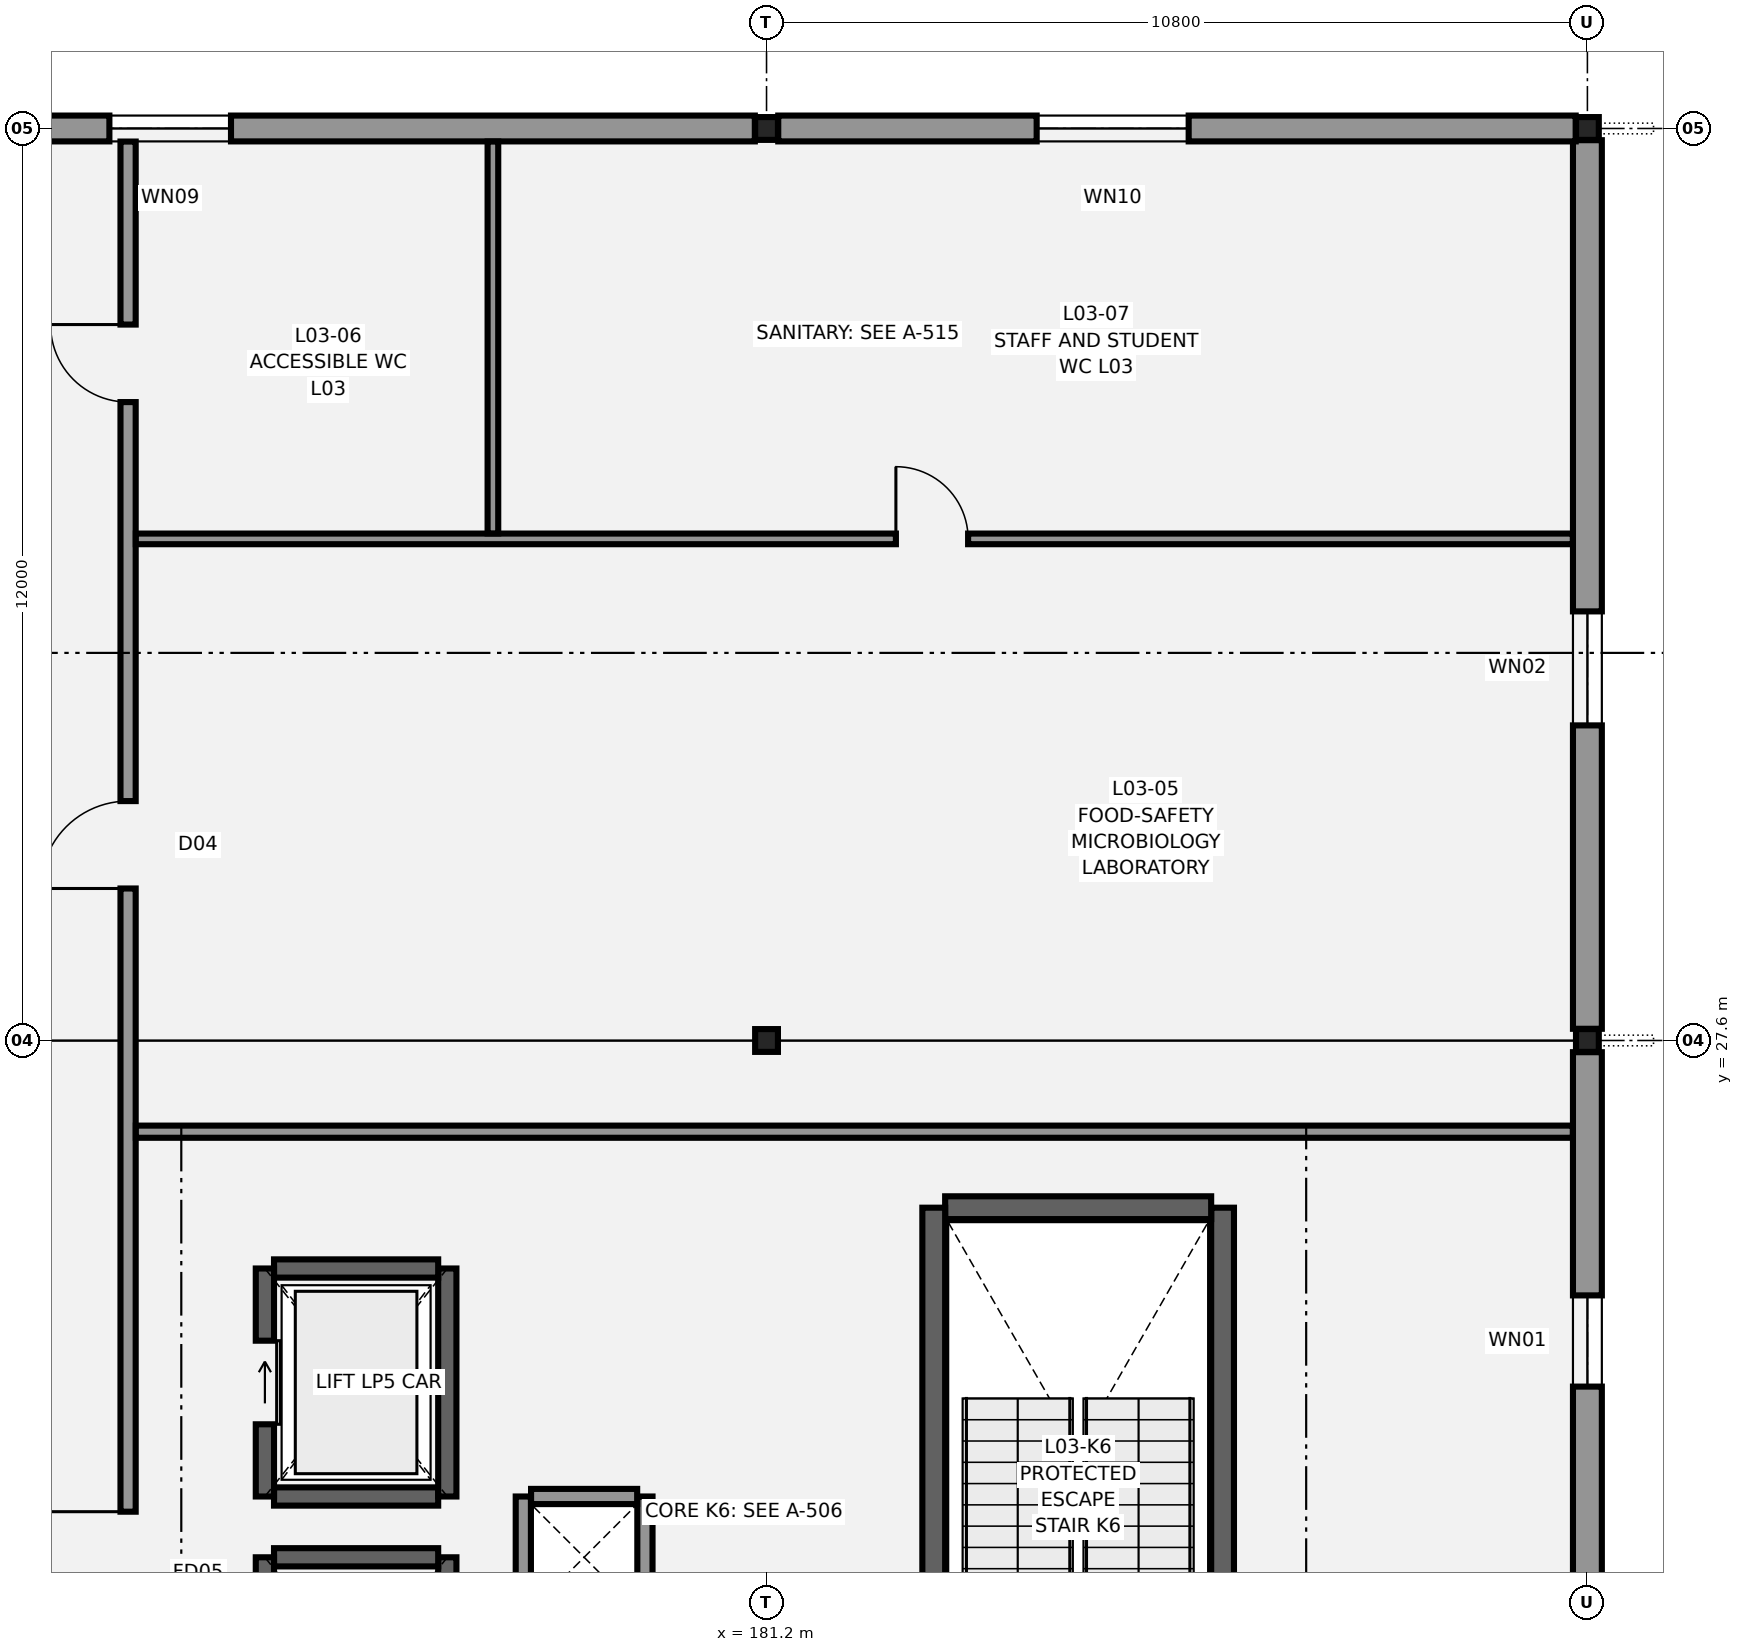
"""IFC4 building model, lengths in metres.
Left out: names, types, materials, properties, quantities, classifications, styles, units other than length and angle.
Written with IfcOpenShell. Run it as: python <this file> out.ifc"""

import sys

from ifc_helpers import new_model, si_unit, direction, frame, frame_2d, origin, origin_2d, place, context, subcontext, project, spatial, rectangle, i_section, extrude, element, fill, save


model = new_model("IFC4")
c1 = context("Model", 3, precision=1e-05, world=origin(), true_north=direction((0.0, 1.0)))
c2 = subcontext(c1, "Body", "Model", "MODEL_VIEW")
j1 = project(units=[si_unit("LENGTHUNIT", "METRE"), si_unit("PLANEANGLEUNIT", "RADIAN")], contexts=[c1])
p1 = place(None, origin())
s1 = spatial("IfcSite", under=j1, at=p1, CompositionType="ELEMENT")
p2 = place(p1, origin())
s2 = spatial("IfcBuilding", under=s1, at=p2, CompositionType="ELEMENT")
p3 = place(p2, frame((0.0, 0.0, 14.4)))
s3 = spatial("IfcBuildingStorey", under=s2, at=p3, CompositionType="ELEMENT", Elevation=14.4)
for number, where, z_axis, x_axis in (
    (1, (181.2, 27.6, 0.0), (0.0, 0.0, 1.0), (1.0, 0.0, 0.0)),
    (2, (181.2, 39.6, 0.0), (0.0, 0.0, 1.0), (1.0, 0.0, 0.0)),
    (3, (192.0, 27.6, 0.0), (0.0, 0.0, 1.0), (1.0, 0.0, 0.0)),
    (4, (192.0, 39.6, 0.0), (0.0, 0.0, 1.0), (1.0, 0.0, 0.0)),
):
    element("IfcColumn", number, at=place(p3, frame(where, z_axis=z_axis, x_axis=x_axis)), inside=s3, PredefinedType="COLUMN", context=c2, shape_type="SweptSolid", body=[
        extrude(i_section(OverallWidth=0.3, OverallDepth=0.3, WebThickness=0.011, FlangeThickness=0.019, FilletRadius=0.027, at=origin_2d()), origin(), (0.0, 0.0, 1.0), 4.2),
    ])
p4 = place(p3, frame((187.2, 17.4, 0.0), z_axis=(0.0, 0.0, 1.0), x_axis=(0.0, 1.0, 0.0)))
e5 = element("IfcWall", 5, at=p4, inside=s3, PredefinedType="SHEAR", context=c2, shape_type="SweptSolid", body=[
    extrude(rectangle(XDim=8.0, YDim=0.3, at=frame_2d((4.0, 0.0))), origin(), (0.0, 0.0, 1.0), 3.98),
])
p5 = place(p3, frame((187.05, 25.4, 0.0), z_axis=(0.0, 0.0, 1.0), x_axis=(-1.0, 0.0, 0.0)))
e6 = element("IfcWall", 6, at=p5, inside=s3, PredefinedType="SHEAR", context=c2, shape_type="SweptSolid", body=[
    extrude(rectangle(XDim=3.5, YDim=0.3, at=frame_2d((1.75, 0.0))), origin(), (0.0, 0.0, 1.0), 3.98),
])
p6 = place(p3, frame((183.4, 25.4, 0.0), z_axis=(0.0, 0.0, 1.0), x_axis=(0.0, -1.0, 0.0)))
e7 = element("IfcWall", 7, at=p6, inside=s3, PredefinedType="SHEAR", context=c2, shape_type="SweptSolid", body=[
    extrude(rectangle(XDim=8.0, YDim=0.3, at=frame_2d((4.0, 0.0))), origin(), (0.0, 0.0, 1.0), 3.98),
])
p7 = place(p3, frame((177.0, 17.8, 0.0), z_axis=(0.0, 0.0, 1.0), x_axis=(0.0, 1.0, 0.0)))
e8 = element("IfcWall", 8, at=p7, inside=s3, PredefinedType="SHEAR", context=c2, shape_type="SweptSolid", body=[
    extrude(rectangle(XDim=3.0, YDim=0.24, at=frame_2d((1.5, 0.0))), origin(), (0.0, 0.0, 1.0), 3.98),
])
p8 = place(p3, frame((176.88, 20.8, 0.0), z_axis=(0.0, 0.0, 1.0), x_axis=(-1.0, 0.0, 0.0)))
e9 = element("IfcWall", 9, at=p8, inside=s3, PredefinedType="SHEAR", context=c2, shape_type="SweptSolid", body=[
    extrude(rectangle(XDim=2.16, YDim=0.24, at=frame_2d((1.08, 0.0))), origin(), (0.0, 0.0, 1.0), 3.98),
])
p9 = place(p3, frame((174.6, 20.8, 0.0), z_axis=(0.0, 0.0, 1.0), x_axis=(0.0, -1.0, 0.0)))
e10 = element("IfcWall", 10, at=p9, inside=s3, PredefinedType="SHEAR", context=c2, shape_type="SweptSolid", body=[
    extrude(rectangle(XDim=3.0, YDim=0.24, at=frame_2d((1.5, 0.0))), origin(), (0.0, 0.0, 1.0), 3.98),
])
p10 = place(p9, frame((0.95, 0.0, 0.0)))
e11 = element("IfcOpeningElement", 11, at=p10, cuts=e10, PredefinedType="OPENING", context=c2, shape_type="SweptSolid", body=[
    extrude(rectangle(XDim=1.1, YDim=2.1, at=frame_2d((0.55, 1.05))), frame((0.0, 0.13, 0.0), z_axis=(0.0, -1.0, 0.0), x_axis=(1.0, 0.0, 0.0)), (0.0, 0.0, 1.0), 0.26),
])
p11 = place(p3, frame((174.72, 21.6, 0.0), z_axis=(0.0, 0.0, 1.0), x_axis=(1.0, 0.0, 0.0)))
e12 = element("IfcWall", 12, at=p11, inside=s3, PredefinedType="SHEAR", context=c2, shape_type="SweptSolid", body=[
    extrude(rectangle(XDim=2.16, YDim=0.24, at=frame_2d((1.08, 0.0))), origin(), (0.0, 0.0, 1.0), 3.98),
])
p12 = place(p3, frame((177.0, 21.6, 0.0), z_axis=(0.0, 0.0, 1.0), x_axis=(0.0, 1.0, 0.0)))
e13 = element("IfcWall", 13, at=p12, inside=s3, PredefinedType="SHEAR", context=c2, shape_type="SweptSolid", body=[
    extrude(rectangle(XDim=3.0, YDim=0.24, at=frame_2d((1.5, 0.0))), origin(), (0.0, 0.0, 1.0), 3.98),
])
p13 = place(p3, frame((176.88, 24.6, 0.0), z_axis=(0.0, 0.0, 1.0), x_axis=(-1.0, 0.0, 0.0)))
e14 = element("IfcWall", 14, at=p13, inside=s3, PredefinedType="SHEAR", context=c2, shape_type="SweptSolid", body=[
    extrude(rectangle(XDim=2.16, YDim=0.24, at=frame_2d((1.08, 0.0))), origin(), (0.0, 0.0, 1.0), 3.98),
])
p14 = place(p3, frame((174.6, 24.6, 0.0), z_axis=(0.0, 0.0, 1.0), x_axis=(0.0, -1.0, 0.0)))
e15 = element("IfcWall", 15, at=p14, inside=s3, PredefinedType="SHEAR", context=c2, shape_type="SweptSolid", body=[
    extrude(rectangle(XDim=3.0, YDim=0.24, at=frame_2d((1.5, 0.0))), origin(), (0.0, 0.0, 1.0), 3.98),
])
p15 = place(p14, frame((0.95, 0.0, 0.0)))
e16 = element("IfcOpeningElement", 16, at=p15, cuts=e15, PredefinedType="OPENING", context=c2, shape_type="SweptSolid", body=[
    extrude(rectangle(XDim=1.1, YDim=2.1, at=frame_2d((0.55, 1.05))), frame((0.0, 0.13, 0.0), z_axis=(0.0, -1.0, 0.0), x_axis=(1.0, 0.0, 0.0)), (0.0, 0.0, 1.0), 0.26),
])
p16 = place(p3, frame((192.0, 27.446, 0.0), z_axis=(0.0, 0.0, 1.0), x_axis=(0.0, -1.0, 0.0)))
e17 = element("IfcWall", 17, at=p16, inside=s3, PredefinedType="STANDARD", context=c2, shape_type="SweptSolid", body=[
    extrude(rectangle(XDim=11.692, YDim=0.38, at=frame_2d((5.846, 0.0))), origin(), (0.0, 0.0, 1.0), 3.685),
])
p17 = place(p16, frame((3.2, 0.0, 0.8)))
e18 = element("IfcOpeningElement", 18, at=p17, cuts=e17, PredefinedType="OPENING", context=c2, shape_type="SweptSolid", body=[
    extrude(rectangle(XDim=1.2, YDim=1.8, at=frame_2d((0.6, 0.9))), frame((0.0, 0.2, 0.0), z_axis=(0.0, -1.0, 0.0), x_axis=(1.0, 0.0, 0.0)), (0.0, 0.0, 1.0), 0.4),
])
p18 = place(p3, frame((192.0, 39.446, 0.0), z_axis=(0.0, 0.0, 1.0), x_axis=(0.0, -1.0, 0.0)))
e19 = element("IfcWall", 19, at=p18, inside=s3, PredefinedType="STANDARD", context=c2, shape_type="SweptSolid", body=[
    extrude(rectangle(XDim=11.692, YDim=0.38, at=frame_2d((5.846, 0.0))), origin(), (0.0, 0.0, 1.0), 3.625),
])
p19 = place(p18, frame((6.2, 0.0, 0.8)))
e20 = element("IfcOpeningElement", 20, at=p19, cuts=e19, PredefinedType="OPENING", context=c2, shape_type="SweptSolid", body=[
    extrude(rectangle(XDim=1.5, YDim=1.8, at=frame_2d((0.75, 0.9))), frame((0.0, 0.2, 0.0), z_axis=(0.0, -1.0, 0.0), x_axis=(1.0, 0.0, 0.0)), (0.0, 0.0, 1.0), 0.4),
])
p20 = place(p3, frame((170.554, 39.6, 0.0), z_axis=(0.0, 0.0, 1.0), x_axis=(1.0, 0.0, 0.0)))
e21 = element("IfcWall", 21, at=p20, inside=s3, PredefinedType="STANDARD", context=c2, shape_type="SweptSolid", body=[
    extrude(rectangle(XDim=10.492, YDim=0.34, at=frame_2d((5.246, 0.0))), origin(), (0.0, 0.0, 1.0), 3.625),
])
p21 = place(p20, frame((2.0, 0.0, 0.8)))
e22 = element("IfcOpeningElement", 22, at=p21, cuts=e21, PredefinedType="OPENING", context=c2, shape_type="SweptSolid", body=[
    extrude(rectangle(XDim=1.6, YDim=2.0, at=frame_2d((0.8, 1.0))), frame((0.0, 0.18, 0.0), z_axis=(0.0, -1.0, 0.0), x_axis=(1.0, 0.0, 0.0)), (0.0, 0.0, 1.0), 0.36),
])
p22 = place(p3, frame((181.354, 39.6, 0.0), z_axis=(0.0, 0.0, 1.0), x_axis=(1.0, 0.0, 0.0)))
e23 = element("IfcWall", 23, at=p22, inside=s3, PredefinedType="STANDARD", context=c2, shape_type="SweptSolid", body=[
    extrude(rectangle(XDim=10.492, YDim=0.34, at=frame_2d((5.246, 0.0))), origin(), (0.0, 0.0, 1.0), 3.625),
])
p23 = place(p22, frame((3.4, 0.0, 0.8)))
e24 = element("IfcOpeningElement", 24, at=p23, cuts=e23, PredefinedType="OPENING", context=c2, shape_type="SweptSolid", body=[
    extrude(rectangle(XDim=2.0, YDim=2.0, at=frame_2d((1.0, 1.0))), frame((0.0, 0.18, 0.0), z_axis=(0.0, -1.0, 0.0), x_axis=(1.0, 0.0, 0.0)), (0.0, 0.0, 1.0), 0.36),
])
p24 = place(p3, frame((172.8, 6.8, 0.0), z_axis=(0.0, 0.0, 1.0), x_axis=(0.0, 1.0, 0.0)))
e25 = element("IfcWall", 25, at=p24, inside=s3, PredefinedType="PARTITIONING", context=c2, shape_type="SweptSolid", body=[
    extrude(rectangle(XDim=32.628, YDim=0.2, at=frame_2d((16.314, 0.0))), origin(), (0.0, 0.0, 1.0), 3.84),
])
p25 = place(p24, frame((3.2, 0.0, 0.0)))
e26 = element("IfcOpeningElement", 26, at=p25, cuts=e25, PredefinedType="OPENING", context=c2, shape_type="SweptSolid", body=[
    extrude(rectangle(XDim=1.05, YDim=2.15, at=frame_2d((0.525, 1.075))), frame((0.0, 0.11, 0.0), z_axis=(0.0, -1.0, 0.0), x_axis=(1.0, 0.0, 0.0)), (0.0, 0.0, 1.0), 0.22),
])
p26 = place(p24, frame((13.0, 0.0, 0.0)))
e27 = element("IfcOpeningElement", 27, at=p26, cuts=e25, PredefinedType="OPENING", context=c2, shape_type="SweptSolid", body=[
    extrude(rectangle(XDim=1.6, YDim=2.2, at=frame_2d((0.8, 1.1))), frame((0.0, 0.11, 0.0), z_axis=(0.0, -1.0, 0.0), x_axis=(1.0, 0.0, 0.0)), (0.0, 0.0, 1.0), 0.22),
])
p27 = place(p24, frame((22.8, 0.0, 0.0)))
e28 = element("IfcOpeningElement", 28, at=p27, cuts=e25, PredefinedType="OPENING", context=c2, shape_type="SweptSolid", body=[
    extrude(rectangle(XDim=1.15, YDim=2.15, at=frame_2d((0.575, 1.075))), frame((0.0, 0.11, 0.0), z_axis=(0.0, -1.0, 0.0), x_axis=(1.0, 0.0, 0.0)), (0.0, 0.0, 1.0), 0.22),
])
p28 = place(p24, frame((29.2, 0.0, 0.0)))
e29 = element("IfcOpeningElement", 29, at=p28, cuts=e25, PredefinedType="OPENING", context=c2, shape_type="SweptSolid", body=[
    extrude(rectangle(XDim=1.02, YDim=2.12, at=frame_2d((0.51, 1.06))), frame((0.0, 0.11, 0.0), z_axis=(0.0, -1.0, 0.0), x_axis=(1.0, 0.0, 0.0)), (0.0, 0.0, 1.0), 0.22),
])
p29 = place(p24, frame((4.6, 0.0, 1.05)))
e30 = element("IfcOpeningElement", 30, at=p29, cuts=e25, PredefinedType="OPENING", context=c2, shape_type="SweptSolid", body=[
    extrude(rectangle(XDim=2.8, YDim=1.3, at=frame_2d((1.4, 0.65))), frame((0.0, 0.11, 0.0), z_axis=(0.0, -1.0, 0.0), x_axis=(1.0, 0.0, 0.0)), (0.0, 0.0, 1.0), 0.22),
])
p30 = place(p3, frame((172.902, 26.4, 0.0), z_axis=(0.0, 0.0, 1.0), x_axis=(1.0, 0.0, 0.0)))
e31 = element("IfcWall", 31, at=p30, inside=s3, PredefinedType="PARTITIONING", context=c2, shape_type="SweptSolid", body=[
    extrude(rectangle(XDim=18.906, YDim=0.16, at=frame_2d((9.453, 0.0))), origin(), (0.0, 0.0, 1.0), 3.84),
])
p31 = place(p3, frame((172.902, 34.2, 0.0), z_axis=(0.0, 0.0, 1.0), x_axis=(1.0, 0.0, 0.0)))
e32 = element("IfcWall", 32, at=p31, inside=s3, PredefinedType="PARTITIONING", context=c2, shape_type="SweptSolid", body=[
    extrude(rectangle(XDim=18.906, YDim=0.14, at=frame_2d((9.453, 0.0))), origin(), (0.0, 0.0, 1.0), 3.84),
])
p32 = place(p31, frame((10.0, 0.0, 0.0)))
e33 = element("IfcOpeningElement", 33, at=p32, cuts=e32, PredefinedType="OPENING", context=c2, shape_type="SweptSolid", body=[
    extrude(rectangle(XDim=0.95, YDim=2.1, at=frame_2d((0.475, 1.05))), frame((0.0, 0.08, 0.0), z_axis=(0.0, -1.0, 0.0), x_axis=(1.0, 0.0, 0.0)), (0.0, 0.0, 1.0), 0.16),
])
p33 = place(p3, frame((177.6, 34.272, 0.0), z_axis=(0.0, 0.0, 1.0), x_axis=(0.0, 1.0, 0.0)))
e34 = element("IfcWall", 34, at=p33, inside=s3, PredefinedType="PARTITIONING", context=c2, shape_type="SweptSolid", body=[
    extrude(rectangle(XDim=5.156, YDim=0.14, at=frame_2d((2.578, 0.0))), origin(), (0.0, 0.0, 1.0), 3.84),
])
p34 = place(p3, frame((179.6, 20.0, 0.0), z_axis=(0.0, 0.0, 1.0), x_axis=(0.0, 1.0, 0.0)))
e35 = element("IfcWall", 35, at=p34, inside=s3, PredefinedType="PARTITIONING", context=c2, shape_type="SweptSolid", body=[
    extrude(rectangle(XDim=1.6, YDim=0.2, at=frame_2d((0.8, 0.0))), origin(), (0.0, 0.0, 1.0), 3.84),
])
p35 = place(p3, frame((179.498, 21.6, 0.0), z_axis=(0.0, 0.0, 1.0), x_axis=(-1.0, 0.0, 0.0)))
e36 = element("IfcWall", 36, at=p35, inside=s3, PredefinedType="PARTITIONING", context=c2, shape_type="SweptSolid", body=[
    extrude(rectangle(XDim=1.396, YDim=0.2, at=frame_2d((0.698, 0.0))), origin(), (0.0, 0.0, 1.0), 3.84),
])
p36 = place(p3, frame((178.0, 21.6, 0.0), z_axis=(0.0, 0.0, 1.0), x_axis=(0.0, -1.0, 0.0)))
e37 = element("IfcWall", 37, at=p36, inside=s3, PredefinedType="PARTITIONING", context=c2, shape_type="SweptSolid", body=[
    extrude(rectangle(XDim=1.6, YDim=0.2, at=frame_2d((0.8, 0.0))), origin(), (0.0, 0.0, 1.0), 3.84),
])
p37 = place(p17, origin())
e38 = element("IfcWindow", 38, at=p37, inside=s3, PartitioningType="SINGLE_PANEL", PredefinedType="WINDOW", context=c2, shape_type="SweptSolid", body=[
    extrude(rectangle(XDim=1.2, YDim=1.8, at=frame_2d((0.6, 0.9))), frame((0.0, 0.03, 0.0), z_axis=(0.0, -1.0, 0.0), x_axis=(1.0, 0.0, 0.0)), (0.0, 0.0, 1.0), 0.06),
])
fill(e18, e38)
p38 = place(p19, origin())
e39 = element("IfcWindow", 39, at=p38, inside=s3, PartitioningType="SINGLE_PANEL", PredefinedType="WINDOW", context=c2, shape_type="SweptSolid", body=[
    extrude(rectangle(XDim=1.5, YDim=1.8, at=frame_2d((0.75, 0.9))), frame((0.0, 0.03, 0.0), z_axis=(0.0, -1.0, 0.0), x_axis=(1.0, 0.0, 0.0)), (0.0, 0.0, 1.0), 0.06),
])
fill(e20, e39)
p39 = place(p21, origin())
e40 = element("IfcWindow", 40, at=p39, inside=s3, PartitioningType="SINGLE_PANEL", PredefinedType="WINDOW", context=c2, shape_type="SweptSolid", body=[
    extrude(rectangle(XDim=1.6, YDim=2.0, at=frame_2d((0.8, 1.0))), frame((0.0, 0.03, 0.0), z_axis=(0.0, -1.0, 0.0), x_axis=(1.0, 0.0, 0.0)), (0.0, 0.0, 1.0), 0.06),
])
fill(e22, e40)
p40 = place(p23, origin())
e41 = element("IfcWindow", 41, at=p40, inside=s3, PartitioningType="SINGLE_PANEL", PredefinedType="WINDOW", context=c2, shape_type="SweptSolid", body=[
    extrude(rectangle(XDim=2.0, YDim=2.0, at=frame_2d((1.0, 1.0))), frame((0.0, 0.03, 0.0), z_axis=(0.0, -1.0, 0.0), x_axis=(1.0, 0.0, 0.0)), (0.0, 0.0, 1.0), 0.06),
])
fill(e24, e41)
p41 = place(p26, origin())
e42 = element("IfcDoor", 42, at=p41, inside=s3, OperationType="SINGLE_SWING_RIGHT", PredefinedType="DOOR", context=c2, shape_type="SweptSolid", body=[
    extrude(rectangle(XDim=1.6, YDim=2.2, at=frame_2d((0.8, 1.1))), frame((0.0, 0.025, 0.0), z_axis=(0.0, -1.0, 0.0), x_axis=(1.0, 0.0, 0.0)), (0.0, 0.0, 1.0), 0.05),
])
fill(e27, e42)
p42 = place(p27, origin())
e43 = element("IfcDoor", 43, at=p42, inside=s3, OperationType="SINGLE_SWING_LEFT", PredefinedType="DOOR", context=c2, shape_type="SweptSolid", body=[
    extrude(rectangle(XDim=1.15, YDim=2.15, at=frame_2d((0.575, 1.075))), frame((0.0, 0.025, 0.0), z_axis=(0.0, -1.0, 0.0), x_axis=(1.0, 0.0, 0.0)), (0.0, 0.0, 1.0), 0.05),
])
fill(e28, e43)
p43 = place(p28, origin())
e44 = element("IfcDoor", 44, at=p43, inside=s3, OperationType="SINGLE_SWING_RIGHT", PredefinedType="DOOR", context=c2, shape_type="SweptSolid", body=[
    extrude(rectangle(XDim=1.02, YDim=2.12, at=frame_2d((0.51, 1.06))), frame((0.0, 0.025, 0.0), z_axis=(0.0, -1.0, 0.0), x_axis=(1.0, 0.0, 0.0)), (0.0, 0.0, 1.0), 0.05),
])
fill(e29, e44)
p44 = place(p32, origin())
e45 = element("IfcDoor", 45, at=p44, inside=s3, OperationType="SINGLE_SWING_LEFT", PredefinedType="DOOR", context=c2, shape_type="SweptSolid", body=[
    extrude(rectangle(XDim=0.95, YDim=2.1, at=frame_2d((0.475, 1.05))), frame((0.0, 0.025, 0.0), z_axis=(0.0, -1.0, 0.0), x_axis=(1.0, 0.0, 0.0)), (0.0, 0.0, 1.0), 0.05),
])
fill(e33, e45)
p45 = place(p15, origin())
e46 = element("IfcDoor", 46, at=p45, inside=s3, OperationType="SLIDING_TO_LEFT", PredefinedType="DOOR", context=c2, shape_type="SweptSolid", body=[
    extrude(rectangle(XDim=1.1, YDim=2.1, at=frame_2d((0.55, 1.05))), frame((0.0, 0.025, 0.0), z_axis=(0.0, -1.0, 0.0), x_axis=(1.0, 0.0, 0.0)), (0.0, 0.0, 1.0), 0.05),
])
fill(e16, e46)
save(model, sys.argv[1])
